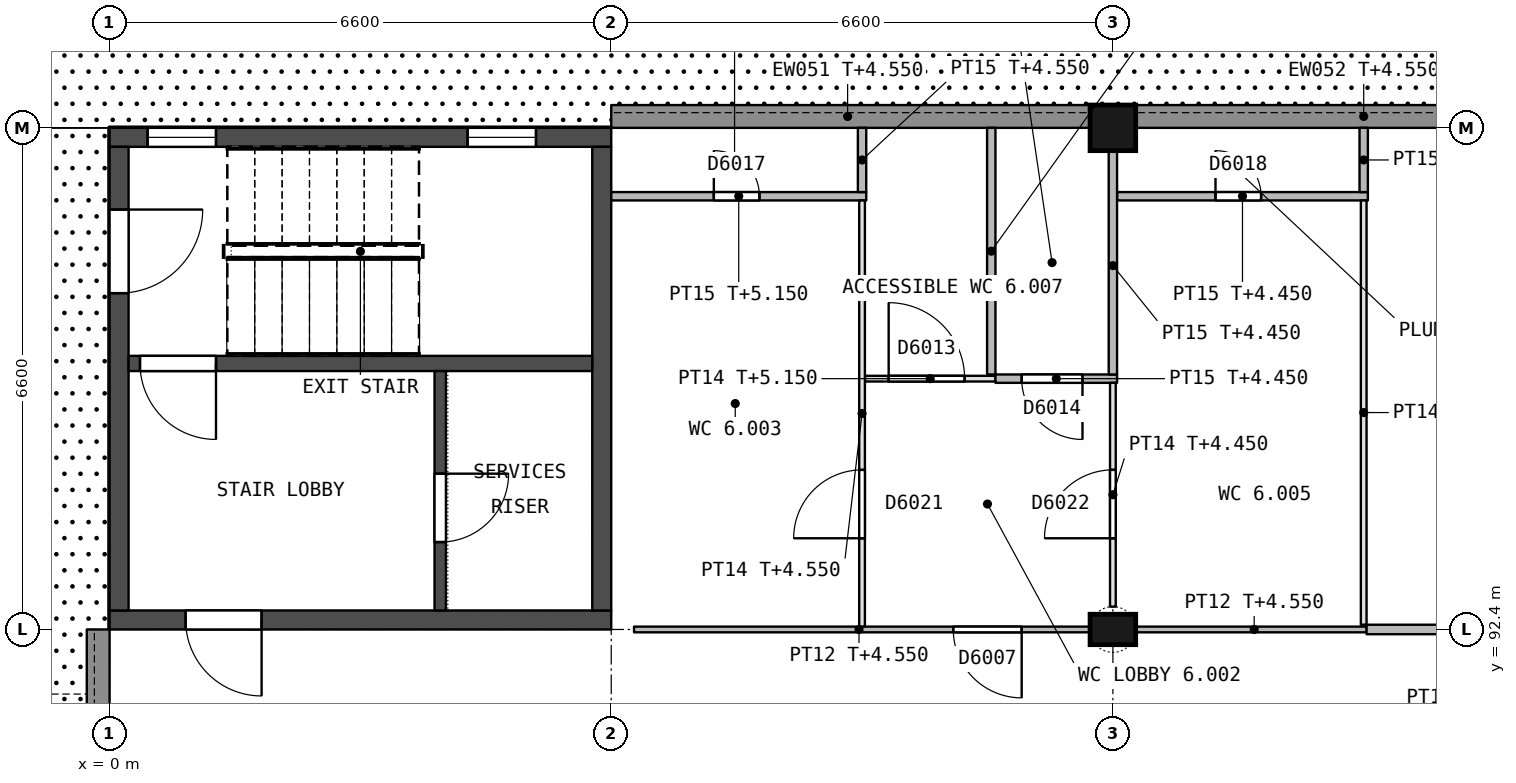
"""IFC4 building model, lengths in metres.
Left out: names, types, materials, properties, quantities, classifications, styles, units other than length and angle.
Written with IfcOpenShell. Run it as: python <this file> out.ifc"""

import sys

from ifc_helpers import new_model, si_unit, direction, frame, frame_2d, origin, origin_2d, place, context, subcontext, project, spatial, rectangle, extrude, element, fill, save


model = new_model("IFC4")
c1 = context("Model", 3, precision=1e-05, world=origin(), true_north=direction((0.0, 1.0)))
c2 = subcontext(c1, "Body", "Model", "MODEL_VIEW")
j1 = project(units=[si_unit("LENGTHUNIT", "METRE"), si_unit("PLANEANGLEUNIT", "RADIAN")], contexts=[c1])
p1 = place(None, origin())
s1 = spatial("IfcSite", under=j1, at=p1, CompositionType="ELEMENT")
p2 = place(p1, origin())
s2 = spatial("IfcBuilding", under=s1, at=p2, CompositionType="ELEMENT")
p3 = place(p2, origin())
s3 = spatial("IfcBuildingStorey", under=s2, at=p3, CompositionType="ELEMENT", Elevation=0.0)
p4 = place(p3, frame((13.2, 92.4, 0.0), z_axis=(0.0, 0.0, 1.0), x_axis=(1.0, 0.0, 0.0)))
e1 = element("IfcColumn", 1, at=p4, inside=s3, PredefinedType="COLUMN", context=c2, shape_type="SweptSolid", body=[
    extrude(rectangle(XDim=0.6, YDim=0.4, at=origin_2d()), origin(), (0.0, 0.0, 1.0), 5.4),
])
p5 = place(p3, frame((13.2, 99.0, 0.0), z_axis=(0.0, 0.0, 1.0), x_axis=(1.0, 0.0, 0.0)))
e2 = element("IfcColumn", 2, at=p5, inside=s3, PredefinedType="COLUMN", context=c2, shape_type="SweptSolid", body=[
    extrude(rectangle(XDim=0.6, YDim=0.6, at=origin_2d()), origin(), (0.0, 0.0, 1.0), 5.4),
])
p6 = place(p3, frame((0.0, 92.525, 0.0), z_axis=(0.0, 0.0, 1.0), x_axis=(1.0, 0.0, 0.0)))
e3 = element("IfcWall", 3, at=p6, inside=s3, PredefinedType="SHEAR", context=c2, shape_type="SweptSolid", body=[
    extrude(rectangle(XDim=6.6, YDim=0.25, at=frame_2d((3.3, 0.0))), origin(), (0.0, 0.0, 1.0), 5.15),
])
p7 = place(p6, frame((1.0, 0.0, 0.0)))
e4 = element("IfcOpeningElement", 4, at=p7, cuts=e3, PredefinedType="OPENING", context=c2, shape_type="SweptSolid", body=[
    extrude(rectangle(XDim=1.0, YDim=2.1, at=frame_2d((0.5, 1.05))), frame((0.0, 0.135, 0.0), z_axis=(0.0, -1.0, 0.0), x_axis=(1.0, 0.0, 0.0)), (0.0, 0.0, 1.0), 0.27),
])
p8 = place(p3, frame((0.0, 98.875, 0.0), z_axis=(0.0, 0.0, 1.0), x_axis=(1.0, 0.0, 0.0)))
e5 = element("IfcWall", 5, at=p8, inside=s3, PredefinedType="SHEAR", context=c2, shape_type="SweptSolid", body=[
    extrude(rectangle(XDim=6.6, YDim=0.25, at=frame_2d((3.3, 0.0))), origin(), (0.0, 0.0, 1.0), 5.15),
])
p9 = place(p8, frame((4.71, 0.0, 2.05)))
e6 = element("IfcOpeningElement", 6, at=p9, cuts=e5, PredefinedType="OPENING", context=c2, shape_type="SweptSolid", body=[
    extrude(rectangle(XDim=0.9, YDim=1.2, at=frame_2d((0.45, 0.6))), frame((0.0, 0.135, 0.0), z_axis=(0.0, -1.0, 0.0), x_axis=(1.0, 0.0, 0.0)), (0.0, 0.0, 1.0), 0.27),
])
p10 = place(p8, frame((0.5, 0.0, 3.4)))
e7 = element("IfcOpeningElement", 7, at=p10, cuts=e5, PredefinedType="OPENING", context=c2, shape_type="SweptSolid", body=[
    extrude(rectangle(XDim=0.9, YDim=1.2, at=frame_2d((0.45, 0.6))), frame((0.0, 0.135, 0.0), z_axis=(0.0, -1.0, 0.0), x_axis=(1.0, 0.0, 0.0)), (0.0, 0.0, 1.0), 0.27),
])
p11 = place(p3, frame((0.125, 92.65, 0.0), z_axis=(0.0, 0.0, 1.0), x_axis=(0.0, 1.0, 0.0)))
e8 = element("IfcWall", 8, at=p11, inside=s3, PredefinedType="SHEAR", context=c2, shape_type="SweptSolid", body=[
    extrude(rectangle(XDim=6.1, YDim=0.25, at=frame_2d((3.05, 0.0))), origin(), (0.0, 0.0, 1.0), 5.15),
])
p12 = place(p11, frame((4.175, 0.0, 0.0)))
e9 = element("IfcOpeningElement", 9, at=p12, cuts=e8, PredefinedType="OPENING", context=c2, shape_type="SweptSolid", body=[
    extrude(rectangle(XDim=1.1, YDim=2.4, at=frame_2d((0.55, 1.2))), frame((0.0, 0.135, 0.0), z_axis=(0.0, -1.0, 0.0), x_axis=(1.0, 0.0, 0.0)), (0.0, 0.0, 1.0), 0.27),
])
p13 = place(p3, frame((6.475, 92.65, 0.0), z_axis=(0.0, 0.0, 1.0), x_axis=(0.0, 1.0, 0.0)))
e10 = element("IfcWall", 10, at=p13, inside=s3, PredefinedType="SHEAR", context=c2, shape_type="SweptSolid", body=[
    extrude(rectangle(XDim=6.1, YDim=0.25, at=frame_2d((3.05, 0.0))), origin(), (0.0, 0.0, 1.0), 5.15),
])
p14 = place(p3, frame((0.25, 95.9, 0.0), z_axis=(0.0, 0.0, 1.0), x_axis=(1.0, 0.0, 0.0)))
e11 = element("IfcWall", 11, at=p14, inside=s3, PredefinedType="SHEAR", context=c2, shape_type="SweptSolid", body=[
    extrude(rectangle(XDim=6.1, YDim=0.2, at=frame_2d((3.05, 0.0))), origin(), (0.0, 0.0, 1.0), 5.15),
])
p15 = place(p14, frame((0.15, 0.0, 0.0)))
e12 = element("IfcOpeningElement", 12, at=p15, cuts=e11, PredefinedType="OPENING", context=c2, shape_type="SweptSolid", body=[
    extrude(rectangle(XDim=1.0, YDim=2.1, at=frame_2d((0.5, 1.05))), frame((0.0, 0.11, 0.0), z_axis=(0.0, -1.0, 0.0), x_axis=(1.0, 0.0, 0.0)), (0.0, 0.0, 1.0), 0.22),
])
p16 = place(p3, frame((4.35, 92.65, 0.0), z_axis=(0.0, 0.0, 1.0), x_axis=(0.0, 1.0, 0.0)))
e13 = element("IfcWall", 13, at=p16, inside=s3, PredefinedType="SHEAR", context=c2, shape_type="SweptSolid", body=[
    extrude(rectangle(XDim=3.15, YDim=0.15, at=frame_2d((1.575, 0.0))), origin(), (0.0, 0.0, 1.0), 5.15),
])
p17 = place(p16, frame((0.9, 0.0, 0.0)))
e14 = element("IfcOpeningElement", 14, at=p17, cuts=e13, PredefinedType="OPENING", context=c2, shape_type="SweptSolid", body=[
    extrude(rectangle(XDim=0.9, YDim=2.1, at=frame_2d((0.45, 1.05))), frame((0.0, 0.085, 0.0), z_axis=(0.0, -1.0, 0.0), x_axis=(1.0, 0.0, 0.0)), (0.0, 0.0, 1.0), 0.17),
])
p18 = place(p3, frame((6.6, 99.15, 0.0), z_axis=(0.0, 0.0, 1.0), x_axis=(1.0, 0.0, 0.0)))
e15 = element("IfcWall", 15, at=p18, inside=s3, PredefinedType="STANDARD", context=c2, shape_type="SweptSolid", body=[
    extrude(rectangle(XDim=6.3, YDim=0.3, at=frame_2d((3.15, 0.0))), origin(), (0.0, 0.0, 1.0), 4.55),
])
p19 = place(p3, frame((13.5, 99.15, 0.0), z_axis=(0.0, 0.0, 1.0), x_axis=(1.0, 0.0, 0.0)))
e16 = element("IfcWall", 16, at=p19, inside=s3, PredefinedType="STANDARD", context=c2, shape_type="SweptSolid", body=[
    extrude(rectangle(XDim=6.0, YDim=0.3, at=frame_2d((3.0, 0.0))), origin(), (0.0, 0.0, 1.0), 4.55),
])
p20 = place(p3, frame((-0.15, 89.3, 0.0), z_axis=(0.0, 0.0, 1.0), x_axis=(0.0, 1.0, 0.0)))
e17 = element("IfcWall", 17, at=p20, inside=s3, PredefinedType="STANDARD", context=c2, shape_type="SweptSolid", body=[
    extrude(rectangle(XDim=3.1, YDim=0.3, at=frame_2d((1.55, 0.0))), origin(), (0.0, 0.0, 1.0), 4.55),
])
p21 = place(p20, frame((0.85, 0.0, 1.1)))
e18 = element("IfcOpeningElement", 18, at=p21, cuts=e17, PredefinedType="OPENING", context=c2, shape_type="SweptSolid", body=[
    extrude(rectangle(XDim=1.2, YDim=1.2, at=frame_2d((0.6, 0.6))), frame((0.0, 0.16, 0.0), z_axis=(0.0, -1.0, 0.0), x_axis=(1.0, 0.0, 0.0)), (0.0, 0.0, 1.0), 0.32),
])
p22 = place(p3, frame((6.9, 92.4, 0.0), z_axis=(0.0, 0.0, 1.0), x_axis=(1.0, 0.0, 0.0)))
e19 = element("IfcWall", 19, at=p22, inside=s3, PredefinedType="PARTITIONING", context=c2, shape_type="SweptSolid", body=[
    extrude(rectangle(XDim=6.0, YDim=0.075, at=frame_2d((3.0, 0.0))), origin(), (0.0, 0.0, 1.0), 4.55),
])
p23 = place(p22, frame((4.2, 0.0, 0.0)))
e20 = element("IfcOpeningElement", 20, at=p23, cuts=e19, PredefinedType="OPENING", context=c2, shape_type="SweptSolid", body=[
    extrude(rectangle(XDim=0.9, YDim=2.1, at=frame_2d((0.45, 1.05))), frame((0.0, 0.047, 0.0), z_axis=(0.0, -1.0, 0.0), x_axis=(1.0, 0.0, 0.0)), (0.0, 0.0, 1.0), 0.095),
])
p24 = place(p3, frame((13.5, 92.4, 0.0), z_axis=(0.0, 0.0, 1.0), x_axis=(1.0, 0.0, 0.0)))
e21 = element("IfcWall", 21, at=p24, inside=s3, PredefinedType="PARTITIONING", context=c2, shape_type="SweptSolid", body=[
    extrude(rectangle(XDim=3.038, YDim=0.075, at=frame_2d((1.519, 0.0))), origin(), (0.0, 0.0, 1.0), 4.55),
])
p25 = place(p3, frame((16.538, 92.4, 0.0), z_axis=(0.0, 0.0, 1.0), x_axis=(1.0, 0.0, 0.0)))
e22 = element("IfcWall", 22, at=p25, inside=s3, PredefinedType="PARTITIONING", context=c2, shape_type="SweptSolid", body=[
    extrude(rectangle(XDim=2.962, YDim=0.125, at=frame_2d((1.481, 0.0))), origin(), (0.0, 0.0, 1.0), 4.55),
])
p26 = place(p25, frame((1.862, 0.0, 0.0)))
e23 = element("IfcOpeningElement", 23, at=p26, cuts=e22, PredefinedType="OPENING", context=c2, shape_type="SweptSolid", body=[
    extrude(rectangle(XDim=1.0, YDim=2.1, at=frame_2d((0.5, 1.05))), frame((0.0, 0.073, 0.0), z_axis=(0.0, -1.0, 0.0), x_axis=(1.0, 0.0, 0.0)), (0.0, 0.0, 1.0), 0.145),
])
p27 = place(p3, frame((11.655, 95.7, 0.0), z_axis=(0.0, 0.0, 1.0), x_axis=(-1.0, 0.0, 0.0)))
e24 = element("IfcWall", 24, at=p27, inside=s3, PredefinedType="PARTITIONING", context=c2, shape_type="SweptSolid", body=[
    extrude(rectangle(XDim=1.717, YDim=0.075, at=frame_2d((0.858, 0.0))), origin(), (0.0, 0.0, 1.0), 5.15),
])
p28 = place(p27, frame((0.405, 0.0, 0.0)))
e25 = element("IfcOpeningElement", 25, at=p28, cuts=e24, PredefinedType="OPENING", context=c2, shape_type="SweptSolid", body=[
    extrude(rectangle(XDim=1.0, YDim=2.1, at=frame_2d((0.5, 1.05))), frame((0.0, 0.047, 0.0), z_axis=(0.0, -1.0, 0.0), x_axis=(1.0, 0.0, 0.0)), (0.0, 0.0, 1.0), 0.095),
])
p29 = place(p3, frame((11.655, 95.7, 0.0), z_axis=(0.0, 0.0, 1.0), x_axis=(1.0, 0.0, 0.0)))
e26 = element("IfcWall", 26, at=p29, inside=s3, PredefinedType="PARTITIONING", context=c2, shape_type="SweptSolid", body=[
    extrude(rectangle(XDim=1.6, YDim=0.11, at=frame_2d((0.8, 0.0))), origin(), (0.0, 0.0, 1.0), 4.45),
])
p30 = place(p29, frame((0.345, 0.0, 0.0)))
e27 = element("IfcOpeningElement", 27, at=p30, cuts=e26, PredefinedType="OPENING", context=c2, shape_type="SweptSolid", body=[
    extrude(rectangle(XDim=0.8, YDim=2.1, at=frame_2d((0.4, 1.05))), frame((0.0, 0.065, 0.0), z_axis=(0.0, -1.0, 0.0), x_axis=(1.0, 0.0, 0.0)), (0.0, 0.0, 1.0), 0.13),
])
p31 = place(p3, frame((9.955, 98.1, 0.0), z_axis=(0.0, 0.0, 1.0), x_axis=(-1.0, 0.0, 0.0)))
e28 = element("IfcWall", 28, at=p31, inside=s3, PredefinedType="PARTITIONING", context=c2, shape_type="SweptSolid", body=[
    extrude(rectangle(XDim=3.355, YDim=0.11, at=frame_2d((1.677, 0.0))), origin(), (0.0, 0.0, 1.0), 5.15),
])
p32 = place(p31, frame((1.405, 0.0, 0.0)))
e29 = element("IfcOpeningElement", 29, at=p32, cuts=e28, PredefinedType="OPENING", context=c2, shape_type="SweptSolid", body=[
    extrude(rectangle(XDim=0.6, YDim=2.1, at=frame_2d((0.3, 1.05))), frame((0.0, 0.065, 0.0), z_axis=(0.0, -1.0, 0.0), x_axis=(1.0, 0.0, 0.0)), (0.0, 0.0, 1.0), 0.13),
])
p33 = place(p3, frame((16.555, 98.1, 0.0), z_axis=(0.0, 0.0, 1.0), x_axis=(-1.0, 0.0, 0.0)))
e30 = element("IfcWall", 30, at=p33, inside=s3, PredefinedType="PARTITIONING", context=c2, shape_type="SweptSolid", body=[
    extrude(rectangle(XDim=3.3, YDim=0.11, at=frame_2d((1.65, 0.0))), origin(), (0.0, 0.0, 1.0), 4.45),
])
p34 = place(p33, frame((1.405, 0.0, 0.0)))
e31 = element("IfcOpeningElement", 31, at=p34, cuts=e30, PredefinedType="OPENING", context=c2, shape_type="SweptSolid", body=[
    extrude(rectangle(XDim=0.6, YDim=2.1, at=frame_2d((0.3, 1.05))), frame((0.0, 0.065, 0.0), z_axis=(0.0, -1.0, 0.0), x_axis=(1.0, 0.0, 0.0)), (0.0, 0.0, 1.0), 0.13),
])
p35 = place(p3, frame((9.9, 92.438, 0.0), z_axis=(0.0, 0.0, 1.0), x_axis=(0.0, 1.0, 0.0)))
e32 = element("IfcWall", 32, at=p35, inside=s3, PredefinedType="PARTITIONING", context=c2, shape_type="SweptSolid", body=[
    extrude(rectangle(XDim=5.607, YDim=0.075, at=frame_2d((2.803, 0.0))), origin(), (0.0, 0.0, 1.0), 4.55),
])
p36 = place(p35, frame((1.162, 0.0, 0.0)))
e33 = element("IfcOpeningElement", 33, at=p36, cuts=e32, PredefinedType="OPENING", context=c2, shape_type="SweptSolid", body=[
    extrude(rectangle(XDim=0.9, YDim=2.1, at=frame_2d((0.45, 1.05))), frame((0.0, 0.047, 0.0), z_axis=(0.0, -1.0, 0.0), x_axis=(1.0, 0.0, 0.0)), (0.0, 0.0, 1.0), 0.095),
])
p37 = place(p3, frame((9.9, 98.155, 0.0), z_axis=(0.0, 0.0, 1.0), x_axis=(0.0, 1.0, 0.0)))
e34 = element("IfcWall", 34, at=p37, inside=s3, PredefinedType="PARTITIONING", context=c2, shape_type="SweptSolid", body=[
    extrude(rectangle(XDim=0.845, YDim=0.11, at=frame_2d((0.422, 0.0))), origin(), (0.0, 0.0, 1.0), 4.55),
])
p38 = place(p3, frame((11.6, 95.755, 0.0), z_axis=(0.0, 0.0, 1.0), x_axis=(0.0, 1.0, 0.0)))
e35 = element("IfcWall", 35, at=p38, inside=s3, PredefinedType="PARTITIONING", context=c2, shape_type="SweptSolid", body=[
    extrude(rectangle(XDim=3.245, YDim=0.11, at=frame_2d((1.623, 0.0))), origin(), (0.0, 0.0, 1.0), 4.55),
])
p39 = place(p3, frame((13.2, 95.645, 0.0), z_axis=(0.0, 0.0, 1.0), x_axis=(0.0, -1.0, 0.0)))
e36 = element("IfcWall", 36, at=p39, inside=s3, PredefinedType="PARTITIONING", context=c2, shape_type="SweptSolid", body=[
    extrude(rectangle(XDim=2.945, YDim=0.075, at=frame_2d((1.473, 0.0))), origin(), (0.0, 0.0, 1.0), 4.45),
])
p40 = place(p39, frame((1.145, 0.0, 0.0)))
e37 = element("IfcOpeningElement", 37, at=p40, cuts=e36, PredefinedType="OPENING", context=c2, shape_type="SweptSolid", body=[
    extrude(rectangle(XDim=0.9, YDim=2.1, at=frame_2d((0.45, 1.05))), frame((0.0, 0.047, 0.0), z_axis=(0.0, -1.0, 0.0), x_axis=(1.0, 0.0, 0.0)), (0.0, 0.0, 1.0), 0.095),
])
p41 = place(p3, frame((13.2, 95.755, 0.0), z_axis=(0.0, 0.0, 1.0), x_axis=(0.0, 1.0, 0.0)))
e38 = element("IfcWall", 38, at=p41, inside=s3, PredefinedType="PARTITIONING", context=c2, shape_type="SweptSolid", body=[
    extrude(rectangle(XDim=2.945, YDim=0.11, at=frame_2d((1.473, 0.0))), origin(), (0.0, 0.0, 1.0), 4.45),
])
p42 = place(p3, frame((16.5, 92.463, 0.0), z_axis=(0.0, 0.0, 1.0), x_axis=(0.0, 1.0, 0.0)))
e39 = element("IfcWall", 39, at=p42, inside=s3, PredefinedType="PARTITIONING", context=c2, shape_type="SweptSolid", body=[
    extrude(rectangle(XDim=5.582, YDim=0.075, at=frame_2d((2.791, 0.0))), origin(), (0.0, 0.0, 1.0), 4.55),
])
p43 = place(p3, frame((16.5, 98.155, 0.0), z_axis=(0.0, 0.0, 1.0), x_axis=(0.0, 1.0, 0.0)))
e40 = element("IfcWall", 40, at=p43, inside=s3, PredefinedType="PARTITIONING", context=c2, shape_type="SweptSolid", body=[
    extrude(rectangle(XDim=0.845, YDim=0.11, at=frame_2d((0.422, 0.0))), origin(), (0.0, 0.0, 1.0), 4.55),
])
p44 = place(p17, origin())
e41 = element("IfcDoor", 41, at=p44, inside=s3, OperationType="SINGLE_SWING_RIGHT", PredefinedType="DOOR", context=c2, shape_type="SweptSolid", body=[
    extrude(rectangle(XDim=0.9, YDim=2.1, at=frame_2d((0.45, 1.05))), frame((0.0, 0.025, 0.0), z_axis=(0.0, -1.0, 0.0), x_axis=(1.0, 0.0, 0.0)), (0.0, 0.0, 1.0), 0.05),
])
fill(e14, e41)
p45 = place(p7, origin())
e42 = element("IfcDoor", 42, at=p45, inside=s3, OperationType="SINGLE_SWING_RIGHT", PredefinedType="DOOR", context=c2, shape_type="SweptSolid", body=[
    extrude(rectangle(XDim=1.0, YDim=2.1, at=frame_2d((0.5, 1.05))), frame((0.0, 0.025, 0.0), z_axis=(0.0, -1.0, 0.0), x_axis=(1.0, 0.0, 0.0)), (0.0, 0.0, 1.0), 0.05),
])
fill(e4, e42)
p46 = place(p15, origin())
e43 = element("IfcDoor", 43, at=p46, inside=s3, OperationType="SINGLE_SWING_RIGHT", PredefinedType="DOOR", context=c2, shape_type="SweptSolid", body=[
    extrude(rectangle(XDim=1.0, YDim=2.1, at=frame_2d((0.5, 1.05))), frame((0.0, 0.025, 0.0), z_axis=(0.0, -1.0, 0.0), x_axis=(1.0, 0.0, 0.0)), (0.0, 0.0, 1.0), 0.05),
])
fill(e12, e43)
p47 = place(p12, origin())
e44 = element("IfcDoor", 44, at=p47, inside=s3, OperationType="SINGLE_SWING_RIGHT", PredefinedType="DOOR", context=c2, shape_type="SweptSolid", body=[
    extrude(rectangle(XDim=1.1, YDim=2.4, at=frame_2d((0.55, 1.2))), frame((0.0, 0.025, 0.0), z_axis=(0.0, -1.0, 0.0), x_axis=(1.0, 0.0, 0.0)), (0.0, 0.0, 1.0), 0.05),
])
fill(e9, e44)
p48 = place(p9, origin())
e45 = element("IfcWindow", 45, at=p48, inside=s3, PartitioningType="SINGLE_PANEL", PredefinedType="WINDOW", context=c2, shape_type="SweptSolid", body=[
    extrude(rectangle(XDim=0.9, YDim=1.2, at=frame_2d((0.45, 0.6))), frame((0.0, 0.03, 0.0), z_axis=(0.0, -1.0, 0.0), x_axis=(1.0, 0.0, 0.0)), (0.0, 0.0, 1.0), 0.06),
])
fill(e6, e45)
p49 = place(p10, origin())
e46 = element("IfcWindow", 46, at=p49, inside=s3, PartitioningType="SINGLE_PANEL", PredefinedType="WINDOW", context=c2, shape_type="SweptSolid", body=[
    extrude(rectangle(XDim=0.9, YDim=1.2, at=frame_2d((0.45, 0.6))), frame((0.0, 0.03, 0.0), z_axis=(0.0, -1.0, 0.0), x_axis=(1.0, 0.0, 0.0)), (0.0, 0.0, 1.0), 0.06),
])
fill(e7, e46)
p50 = place(p23, origin())
e47 = element("IfcDoor", 47, at=p50, inside=s3, OperationType="SINGLE_SWING_RIGHT", PredefinedType="DOOR", context=c2, shape_type="SweptSolid", body=[
    extrude(rectangle(XDim=0.9, YDim=2.1, at=frame_2d((0.45, 1.05))), frame((0.0, 0.025, 0.0), z_axis=(0.0, -1.0, 0.0), x_axis=(1.0, 0.0, 0.0)), (0.0, 0.0, 1.0), 0.05),
])
fill(e20, e47)
p51 = place(p28, origin())
e48 = element("IfcDoor", 48, at=p51, inside=s3, OperationType="SINGLE_SWING_RIGHT", PredefinedType="DOOR", context=c2, shape_type="SweptSolid", body=[
    extrude(rectangle(XDim=1.0, YDim=2.1, at=frame_2d((0.5, 1.05))), frame((0.0, 0.025, 0.0), z_axis=(0.0, -1.0, 0.0), x_axis=(1.0, 0.0, 0.0)), (0.0, 0.0, 1.0), 0.05),
])
fill(e25, e48)
p52 = place(p30, origin())
e49 = element("IfcDoor", 49, at=p52, inside=s3, OperationType="SINGLE_SWING_RIGHT", PredefinedType="DOOR", context=c2, shape_type="SweptSolid", body=[
    extrude(rectangle(XDim=0.8, YDim=2.1, at=frame_2d((0.4, 1.05))), frame((0.0, 0.025, 0.0), z_axis=(0.0, -1.0, 0.0), x_axis=(1.0, 0.0, 0.0)), (0.0, 0.0, 1.0), 0.05),
])
fill(e27, e49)
p53 = place(p32, origin())
e50 = element("IfcDoor", 50, at=p53, inside=s3, OperationType="SINGLE_SWING_RIGHT", PredefinedType="DOOR", context=c2, shape_type="SweptSolid", body=[
    extrude(rectangle(XDim=0.6, YDim=2.1, at=frame_2d((0.3, 1.05))), frame((0.0, 0.025, 0.0), z_axis=(0.0, -1.0, 0.0), x_axis=(1.0, 0.0, 0.0)), (0.0, 0.0, 1.0), 0.05),
])
fill(e29, e50)
p54 = place(p34, origin())
e51 = element("IfcDoor", 51, at=p54, inside=s3, OperationType="SINGLE_SWING_RIGHT", PredefinedType="DOOR", context=c2, shape_type="SweptSolid", body=[
    extrude(rectangle(XDim=0.6, YDim=2.1, at=frame_2d((0.3, 1.05))), frame((0.0, 0.025, 0.0), z_axis=(0.0, -1.0, 0.0), x_axis=(1.0, 0.0, 0.0)), (0.0, 0.0, 1.0), 0.05),
])
fill(e31, e51)
p55 = place(p36, origin())
e52 = element("IfcDoor", 52, at=p55, inside=s3, OperationType="SINGLE_SWING_LEFT", PredefinedType="DOOR", context=c2, shape_type="SweptSolid", body=[
    extrude(rectangle(XDim=0.9, YDim=2.1, at=frame_2d((0.45, 1.05))), frame((0.0, 0.025, 0.0), z_axis=(0.0, -1.0, 0.0), x_axis=(1.0, 0.0, 0.0)), (0.0, 0.0, 1.0), 0.05),
])
fill(e33, e52)
p56 = place(p40, origin())
e53 = element("IfcDoor", 53, at=p56, inside=s3, OperationType="SINGLE_SWING_RIGHT", PredefinedType="DOOR", context=c2, shape_type="SweptSolid", body=[
    extrude(rectangle(XDim=0.9, YDim=2.1, at=frame_2d((0.45, 1.05))), frame((0.0, 0.025, 0.0), z_axis=(0.0, -1.0, 0.0), x_axis=(1.0, 0.0, 0.0)), (0.0, 0.0, 1.0), 0.05),
])
fill(e37, e53)
save(model, sys.argv[1])
